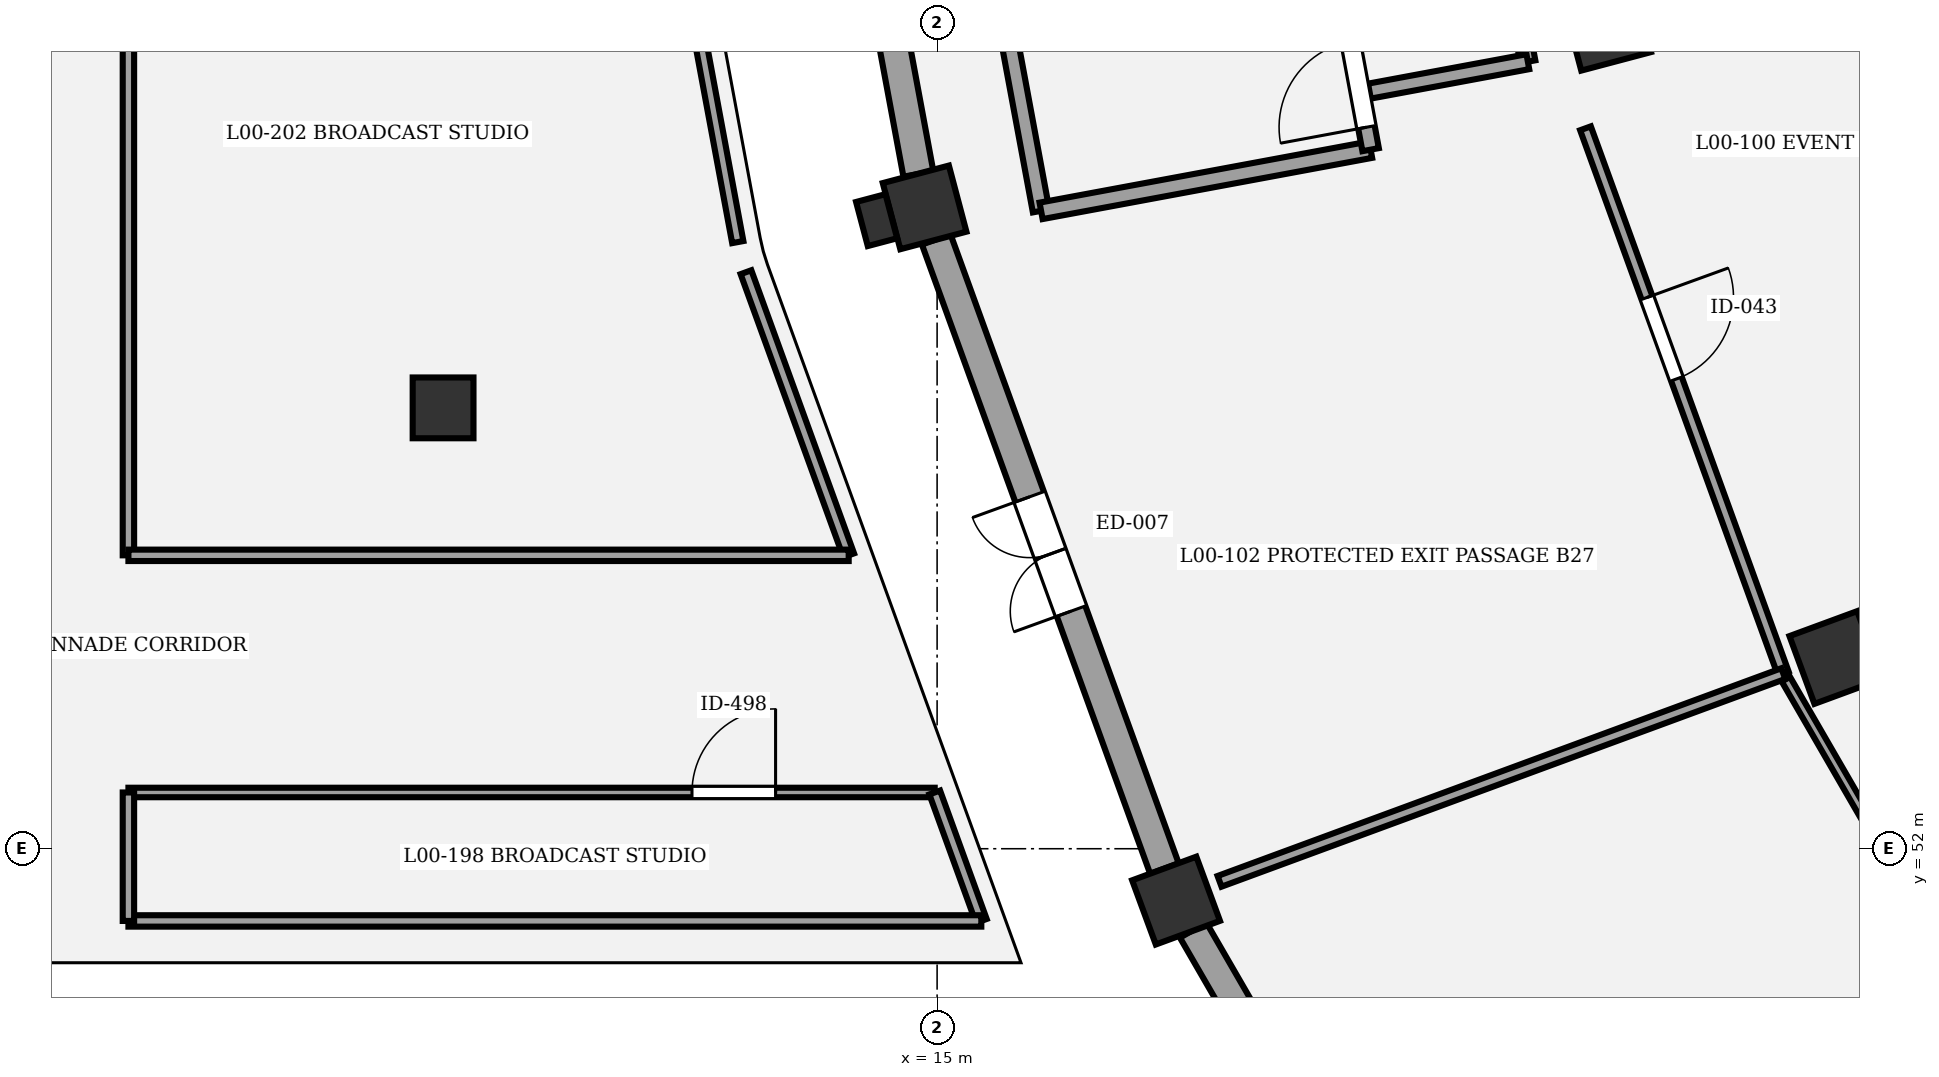
"""IFC4 building model, lengths in metres.
Left out: names, types, materials, properties, quantities, classifications, styles, units other than length and angle.
Written with IfcOpenShell. Run it as: python <this file> out.ifc"""

import sys

from ifc_helpers import new_model, si_unit, direction, frame, frame_2d, origin, origin_2d, place, context, subcontext, project, spatial, rectangle, circle, extrude, element, fill, save


model = new_model("IFC4")
c1 = context("Model", 3, precision=1e-05, world=origin(), true_north=direction((0.0, 1.0)))
c2 = subcontext(c1, "Body", "Model", "MODEL_VIEW")
j1 = project(units=[si_unit("LENGTHUNIT", "METRE"), si_unit("PLANEANGLEUNIT", "RADIAN")], contexts=[c1])
p1 = place(None, origin())
s1 = spatial("IfcSite", under=j1, at=p1, CompositionType="ELEMENT")
p2 = place(p1, origin())
s2 = spatial("IfcBuilding", under=s1, at=p2, CompositionType="ELEMENT")
p3 = place(p2, origin())
s3 = spatial("IfcBuildingStorey", under=s2, at=p3, CompositionType="ELEMENT", Elevation=0.0)
p4 = place(p3, frame((23.812, 62.818, 0.0), z_axis=(0.0, 0.0, 1.0), x_axis=(-0.966600102017, -0.256289373133, 0.0)))
e1 = element("IfcColumn", 1, at=p4, inside=s3, PredefinedType="COLUMN", context=c2, shape_type="SweptSolid", body=[
    extrude(rectangle(XDim=0.95, YDim=0.95, at=origin_2d()), origin(), (0.0, 0.0, 1.0), 5.4),
])
p5 = place(p3, frame((14.835, 60.438, 0.0), z_axis=(0.0, 0.0, 1.0), x_axis=(-0.966600102017, -0.256289373133, 0.0)))
e2 = element("IfcColumn", 2, at=p5, inside=s3, PredefinedType="COLUMN", context=c2, shape_type="SweptSolid", body=[
    extrude(rectangle(XDim=0.9, YDim=0.9, at=origin_2d()), origin(), (0.0, 0.0, 1.0), 5.4),
])
p6 = place(p3, frame((14.204, 60.27, 0.0), z_axis=(0.0, 0.0, 1.0), x_axis=(0.256289373133, -0.966600102017, 0.0)))
e3 = element("IfcColumn", 3, at=p6, inside=s3, PredefinedType="PILASTER", context=c2, shape_type="SweptSolid", body=[
    extrude(rectangle(XDim=0.6, YDim=0.4, at=origin_2d()), origin(), (0.0, 0.0, 1.0), 5.4),
])
p7 = place(p3, frame((26.824, 54.516, 0.0), z_axis=(0.0, 0.0, 1.0), x_axis=(-0.938372433776, -0.34562577382, 0.0)))
e4 = element("IfcColumn", 4, at=p7, inside=s3, PredefinedType="COLUMN", context=c2, shape_type="SweptSolid", body=[
    extrude(rectangle(XDim=0.95, YDim=0.95, at=origin_2d()), origin(), (0.0, 0.0, 1.0), 5.4),
])
p8 = place(p3, frame((18.144, 51.318, 0.0), z_axis=(0.0, 0.0, 1.0), x_axis=(-0.938372433776, -0.34562577382, 0.0)))
e5 = element("IfcColumn", 5, at=p8, inside=s3, PredefinedType="COLUMN", context=c2, shape_type="SweptSolid", body=[
    extrude(rectangle(XDim=0.9, YDim=0.9, at=origin_2d()), origin(), (0.0, 0.0, 1.0), 5.4),
])
p9 = place(p3, frame((8.5, 57.8, 0.0), z_axis=(0.0, 0.0, 1.0), x_axis=(1.0, 0.0, 0.0)))
e6 = element("IfcColumn", 6, at=p9, inside=s3, PredefinedType="COLUMN", context=c2, shape_type="SweptSolid", body=[
    extrude(circle(Radius=0.4, at=origin_2d()), origin(), (0.0, 0.0, 1.0), 5.4),
])
p10 = place(p3, frame((14.754, 60.878, 0.0), z_axis=(0.0, 0.0, 1.0), x_axis=(-0.182624880635, 0.98318266511, 0.0)))
e7 = element("IfcWall", 7, at=p10, inside=s3, PredefinedType="STANDARD", context=c2, shape_type="SweptSolid", body=[
    extrude(rectangle(XDim=10.005, YDim=0.4, at=frame_2d((5.002, 0.0))), origin(), (0.0, 0.0, 1.0), 4.25),
])
p11 = place(p10, frame((4.102, 0.0, 1.1)))
e8 = element("IfcOpeningElement", 8, at=p11, cuts=e7, PredefinedType="OPENING", context=c2, shape_type="SweptSolid", body=[
    extrude(rectangle(XDim=1.8, YDim=1.55, at=frame_2d((0.9, 0.775))), frame((0.0, 0.21, 0.0), z_axis=(0.0, -1.0, 0.0), x_axis=(1.0, 0.0, 0.0)), (0.0, 0.0, 1.0), 0.42),
])
p12 = place(p3, frame((17.991, 51.739, 0.0), z_axis=(0.0, 0.0, 1.0), x_axis=(-0.341030587203, 0.940052199929, 0.0)))
e9 = element("IfcWall", 9, at=p12, inside=s3, PredefinedType="STANDARD", context=c2, shape_type="SweptSolid", body=[
    extrude(rectangle(XDim=8.805, YDim=0.4, at=frame_2d((4.403, 0.0))), origin(), (0.0, 0.0, 1.0), 4.25),
])
p13 = place(p12, frame((3.603, 0.0, 0.0)))
e10 = element("IfcOpeningElement", 10, at=p13, cuts=e9, PredefinedType="OPENING", context=c2, shape_type="SweptSolid", body=[
    extrude(rectangle(XDim=1.6, YDim=2.3, at=frame_2d((0.8, 1.15))), frame((0.0, 0.21, 0.0), z_axis=(0.0, -1.0, 0.0), x_axis=(1.0, 0.0, 0.0)), (0.0, 0.0, 1.0), 0.42),
])
p14 = place(p3, frame((22.533, 43.726, 0.0), z_axis=(0.0, 0.0, 1.0), x_axis=(-0.500543493437, 0.865711390232, 0.0)))
e11 = element("IfcWall", 11, at=p14, inside=s3, PredefinedType="STANDARD", context=c2, shape_type="SweptSolid", body=[
    extrude(rectangle(XDim=8.321, YDim=0.4, at=frame_2d((4.161, 0.0))), origin(), (0.0, 0.0, 1.0), 4.25),
])
p15 = place(p14, frame((3.311, 0.0, 0.0)))
e12 = element("IfcOpeningElement", 12, at=p15, cuts=e11, PredefinedType="OPENING", context=c2, shape_type="SweptSolid", body=[
    extrude(rectangle(XDim=1.7, YDim=2.35, at=frame_2d((0.85, 1.175))), frame((0.0, 0.21, 0.0), z_axis=(0.0, -1.0, 0.0), x_axis=(1.0, 0.0, 0.0)), (0.0, 0.0, 1.0), 0.42),
])
p16 = place(p3, frame((16.368, 60.392, 0.0), z_axis=(0.0, 0.0, 1.0), x_axis=(-0.182570778451, 0.983192712979, 0.0)))
e13 = element("IfcWall", 13, at=p16, inside=s3, PredefinedType="SHEAR", context=c2, shape_type="SweptSolid", body=[
    extrude(rectangle(XDim=11.02, YDim=0.22, at=frame_2d((5.51, 0.0))), origin(), (0.0, 0.0, 1.0), 5.15),
])
p17 = place(p3, frame((20.704, 61.197, 0.0), z_axis=(0.0, 0.0, 1.0), x_axis=(-0.983191575486, -0.182576904051, 0.0)))
e14 = element("IfcWall", 14, at=p17, inside=s3, PredefinedType="SHEAR", context=c2, shape_type="SweptSolid", body=[
    extrude(rectangle(XDim=4.41, YDim=0.22, at=frame_2d((2.205, 0.0))), origin(), (0.0, 0.0, 1.0), 5.15),
])
p18 = place(p3, frame((20.704, 61.197, 0.0), z_axis=(0.0, 0.0, 1.0), x_axis=(-0.182570778451, 0.983192712979, 0.0)))
e15 = element("IfcWall", 15, at=p18, inside=s3, PredefinedType="SHEAR", context=c2, shape_type="SweptSolid", body=[
    extrude(rectangle(XDim=11.02, YDim=0.22, at=frame_2d((5.51, 0.0))), origin(), (0.0, 0.0, 1.0), 5.15),
])
p19 = place(p18, frame((0.3, 0.0, 0.0)))
e16 = element("IfcOpeningElement", 16, at=p19, cuts=e15, PredefinedType="OPENING", context=c2, shape_type="SweptSolid", body=[
    extrude(rectangle(XDim=1.15, YDim=2.15, at=frame_2d((0.575, 1.075))), frame((0.0, 0.12, 0.0), z_axis=(0.0, -1.0, 0.0), x_axis=(1.0, 0.0, 0.0)), (0.0, 0.0, 1.0), 0.24),
])
p20 = place(p18, frame((9.23, 0.0, 0.0)))
e17 = element("IfcOpeningElement", 17, at=p20, cuts=e15, PredefinedType="OPENING", context=c2, shape_type="SweptSolid", body=[
    extrude(rectangle(XDim=1.1, YDim=2.15, at=frame_2d((0.55, 1.075))), frame((0.0, 0.12, 0.0), z_axis=(0.0, -1.0, 0.0), x_axis=(1.0, 0.0, 0.0)), (0.0, 0.0, 1.0), 0.24),
])
p21 = place(p3, frame((22.772, 62.354, 0.0), z_axis=(0.0, 0.0, 1.0), x_axis=(-0.182593081072, 0.983188571305, 0.0)))
e18 = element("IfcWall", 18, at=p21, inside=s3, PredefinedType="PARTITIONING", context=c2, shape_type="SweptSolid", body=[
    extrude(rectangle(XDim=3.8, YDim=0.2, at=frame_2d((1.9, 0.0))), origin(), (0.0, 0.0, 1.0), 4.25),
])
p22 = place(p21, frame((1.3, 0.0, 0.0)))
e19 = element("IfcOpeningElement", 19, at=p22, cuts=e18, PredefinedType="OPENING", context=c2, shape_type="SweptSolid", body=[
    extrude(rectangle(XDim=1.2, YDim=2.18, at=frame_2d((0.6, 1.09))), frame((0.0, 0.11, 0.0), z_axis=(0.0, -1.0, 0.0), x_axis=(1.0, 0.0, 0.0)), (0.0, 0.0, 1.0), 0.22),
])
p23 = place(p3, frame((22.772, 62.354, 0.0), z_axis=(0.0, 0.0, 1.0), x_axis=(-0.983181056789, -0.18263353901, 0.0)))
e20 = element("IfcWall", 20, at=p23, inside=s3, PredefinedType="PARTITIONING", context=c2, shape_type="SweptSolid", body=[
    extrude(rectangle(XDim=2.12, YDim=0.2, at=frame_2d((1.06, 0.0))), origin(), (0.0, 0.0, 1.0), 4.25),
])
p24 = place(p3, frame((23.531, 61.478, 0.0), z_axis=(0.0, 0.0, 1.0), x_axis=(0.341013494536, -0.940058400603, 0.0)))
e21 = element("IfcWall", 21, at=p24, inside=s3, PredefinedType="PARTITIONING", context=c2, shape_type="SweptSolid", body=[
    extrude(rectangle(XDim=7.632, YDim=0.15, at=frame_2d((3.816, 0.0))), origin(), (0.0, 0.0, 1.0), 4.15),
])
p25 = place(p24, frame((2.368, 0.0, 0.0)))
e22 = element("IfcOpeningElement", 22, at=p25, cuts=e21, PredefinedType="OPENING", context=c2, shape_type="SweptSolid", body=[
    extrude(rectangle(XDim=1.14, YDim=2.1, at=frame_2d((0.57, 1.05))), frame((0.0, 0.085, 0.0), z_axis=(0.0, -1.0, 0.0), x_axis=(1.0, 0.0, 0.0)), (0.0, 0.0, 1.0), 0.17),
])
p26 = place(p3, frame((26.167, 54.231, 0.0), z_axis=(0.0, 0.0, 1.0), x_axis=(0.500559280672, -0.865702262059, 0.0)))
e23 = element("IfcWall", 23, at=p26, inside=s3, PredefinedType="PARTITIONING", context=c2, shape_type="SweptSolid", body=[
    extrude(rectangle(XDim=8.375, YDim=0.125, at=frame_2d((4.187, 0.0))), origin(), (0.0, 0.0, 1.0), 4.15),
])
p27 = place(p26, frame((3.577, 0.0, 0.0)))
e24 = element("IfcOpeningElement", 24, at=p27, cuts=e23, PredefinedType="OPENING", context=c2, shape_type="SweptSolid", body=[
    extrude(rectangle(XDim=1.22, YDim=2.1, at=frame_2d((0.61, 1.05))), frame((0.0, 0.073, 0.0), z_axis=(0.0, -1.0, 0.0), x_axis=(1.0, 0.0, 0.0)), (0.0, 0.0, 1.0), 0.145),
])
p28 = place(p3, frame((4.36, 52.74, 0.0), z_axis=(0.0, 0.0, 1.0), x_axis=(1.0, 0.0, 0.0)))
e25 = element("IfcWall", 25, at=p28, inside=s3, PredefinedType="PARTITIONING", context=c2, shape_type="SweptSolid", body=[
    extrude(rectangle(XDim=10.608, YDim=0.125, at=frame_2d((5.304, 0.0))), origin(), (0.0, 0.0, 1.0), 4.15),
])
p29 = place(p28, frame((7.415, 0.0, 0.0)))
e26 = element("IfcOpeningElement", 26, at=p29, cuts=e25, PredefinedType="OPENING", context=c2, shape_type="SweptSolid", body=[
    extrude(rectangle(XDim=1.1, YDim=2.3, at=frame_2d((0.55, 1.15))), frame((0.0, 0.073, 0.0), z_axis=(0.0, -1.0, 0.0), x_axis=(1.0, 0.0, 0.0)), (0.0, 0.0, 1.0), 0.145),
])
p30 = place(p3, frame((4.36, 55.86, 0.0), z_axis=(0.0, 0.0, 1.0), x_axis=(0.0, 1.0, 0.0)))
e27 = element("IfcWall", 27, at=p30, inside=s3, PredefinedType="PARTITIONING", context=c2, shape_type="SweptSolid", body=[
    extrude(rectangle(XDim=18.69, YDim=0.15, at=frame_2d((9.345, 0.0))), origin(), (0.0, 0.0, 1.0), 4.15),
])
p31 = place(p30, frame((11.233, 0.0, 0.0)))
e28 = element("IfcOpeningElement", 28, at=p31, cuts=e27, PredefinedType="OPENING", context=c2, shape_type="SweptSolid", body=[
    extrude(rectangle(XDim=1.26, YDim=2.3, at=frame_2d((0.63, 1.15))), frame((0.0, 0.085, 0.0), z_axis=(0.0, -1.0, 0.0), x_axis=(1.0, 0.0, 0.0)), (0.0, 0.0, 1.0), 0.17),
])
p32 = place(p3, frame((26.134, 54.304, 0.0), z_axis=(0.0, 0.0, 1.0), x_axis=(-0.938346807893, -0.345695340028, 0.0)))
e29 = element("IfcWall", 29, at=p32, inside=s3, PredefinedType="PARTITIONING", context=c2, shape_type="SweptSolid", body=[
    extrude(rectangle(XDim=7.905, YDim=0.15, at=frame_2d((3.952, 0.0))), origin(), (0.0, 0.0, 1.0), 4.15),
])
p33 = place(p3, frame((14.969, 52.74, 0.0), z_axis=(0.0, 0.0, 1.0), x_axis=(0.341012375502, -0.940058806541, 0.0)))
e30 = element("IfcWall", 30, at=p33, inside=s3, PredefinedType="PARTITIONING", context=c2, shape_type="SweptSolid", body=[
    extrude(rectangle(XDim=1.798, YDim=0.15, at=frame_2d((0.899, 0.0))), origin(), (0.0, 0.0, 1.0), 4.15),
])
p34 = place(p3, frame((15.582, 51.05, 0.0), z_axis=(0.0, 0.0, 1.0), x_axis=(-1.0, 0.0, 0.0)))
e31 = element("IfcWall", 31, at=p34, inside=s3, PredefinedType="PARTITIONING", context=c2, shape_type="SweptSolid", body=[
    extrude(rectangle(XDim=11.221, YDim=0.15, at=frame_2d((5.611, 0.0))), origin(), (0.0, 0.0, 1.0), 4.15),
])
p35 = place(p3, frame((4.36, 51.05, 0.0), z_axis=(0.0, 0.0, 1.0), x_axis=(0.0, 1.0, 0.0)))
e32 = element("IfcWall", 32, at=p35, inside=s3, PredefinedType="PARTITIONING", context=c2, shape_type="SweptSolid", body=[
    extrude(rectangle(XDim=1.69, YDim=0.15, at=frame_2d((0.845, 0.0))), origin(), (0.0, 0.0, 1.0), 4.15),
])
p36 = place(p3, frame((10.387, 70.698, 0.0), z_axis=(0.0, 0.0, 1.0), x_axis=(0.182620957058, -0.983183393901, 0.0)))
e33 = element("IfcWall", 33, at=p36, inside=s3, PredefinedType="PARTITIONING", context=c2, shape_type="SweptSolid", body=[
    extrude(rectangle(XDim=10.901, YDim=0.15, at=frame_2d((5.45, 0.0))), origin(), (0.0, 0.0, 1.0), 4.15),
])
p37 = place(p3, frame((12.485, 59.585, 0.0), z_axis=(0.0, 0.0, 1.0), x_axis=(0.341035525383, -0.94005040845, 0.0)))
e34 = element("IfcWall", 34, at=p37, inside=s3, PredefinedType="PARTITIONING", context=c2, shape_type="SweptSolid", body=[
    extrude(rectangle(XDim=3.962, YDim=0.15, at=frame_2d((1.981, 0.0))), origin(), (0.0, 0.0, 1.0), 4.15),
])
p38 = place(p3, frame((13.837, 55.86, 0.0), z_axis=(0.0, 0.0, 1.0), x_axis=(-1.0, 0.0, 0.0)))
e35 = element("IfcWall", 35, at=p38, inside=s3, PredefinedType="PARTITIONING", context=c2, shape_type="SweptSolid", body=[
    extrude(rectangle(XDim=9.477, YDim=0.15, at=frame_2d((4.738, 0.0))), origin(), (0.0, 0.0, 1.0), 4.15),
])
p39 = place(p13, origin())
e36 = element("IfcDoor", 36, at=p39, inside=s3, OperationType="DOUBLE_DOOR_SINGLE_SWING", PredefinedType="DOOR", context=c2, shape_type="SweptSolid", body=[
    extrude(rectangle(XDim=1.6, YDim=2.3, at=frame_2d((0.8, 1.15))), frame((0.0, 0.025, 0.0), z_axis=(0.0, -1.0, 0.0), x_axis=(1.0, 0.0, 0.0)), (0.0, 0.0, 1.0), 0.05),
])
fill(e10, e36)
p40 = place(p19, origin())
e37 = element("IfcDoor", 37, at=p40, inside=s3, OperationType="SINGLE_SWING_LEFT", PredefinedType="DOOR", context=c2, shape_type="SweptSolid", body=[
    extrude(rectangle(XDim=1.15, YDim=2.15, at=frame_2d((0.575, 1.075))), frame((0.0, 0.025, 0.0), z_axis=(0.0, -1.0, 0.0), x_axis=(1.0, 0.0, 0.0)), (0.0, 0.0, 1.0), 0.05),
])
fill(e16, e37)
p41 = place(p25, origin())
e38 = element("IfcDoor", 38, at=p41, inside=s3, OperationType="SINGLE_SWING_LEFT", PredefinedType="DOOR", context=c2, shape_type="SweptSolid", body=[
    extrude(rectangle(XDim=1.14, YDim=2.1, at=frame_2d((0.57, 1.05))), frame((0.0, 0.025, 0.0), z_axis=(0.0, -1.0, 0.0), x_axis=(1.0, 0.0, 0.0)), (0.0, 0.0, 1.0), 0.05),
])
fill(e22, e38)
p42 = place(p29, origin())
e39 = element("IfcDoor", 39, at=p42, inside=s3, OperationType="SINGLE_SWING_RIGHT", PredefinedType="DOOR", context=c2, shape_type="SweptSolid", body=[
    extrude(rectangle(XDim=1.1, YDim=2.3, at=frame_2d((0.55, 1.15))), frame((0.0, 0.025, 0.0), z_axis=(0.0, -1.0, 0.0), x_axis=(1.0, 0.0, 0.0)), (0.0, 0.0, 1.0), 0.05),
])
fill(e26, e39)
save(model, sys.argv[1])
